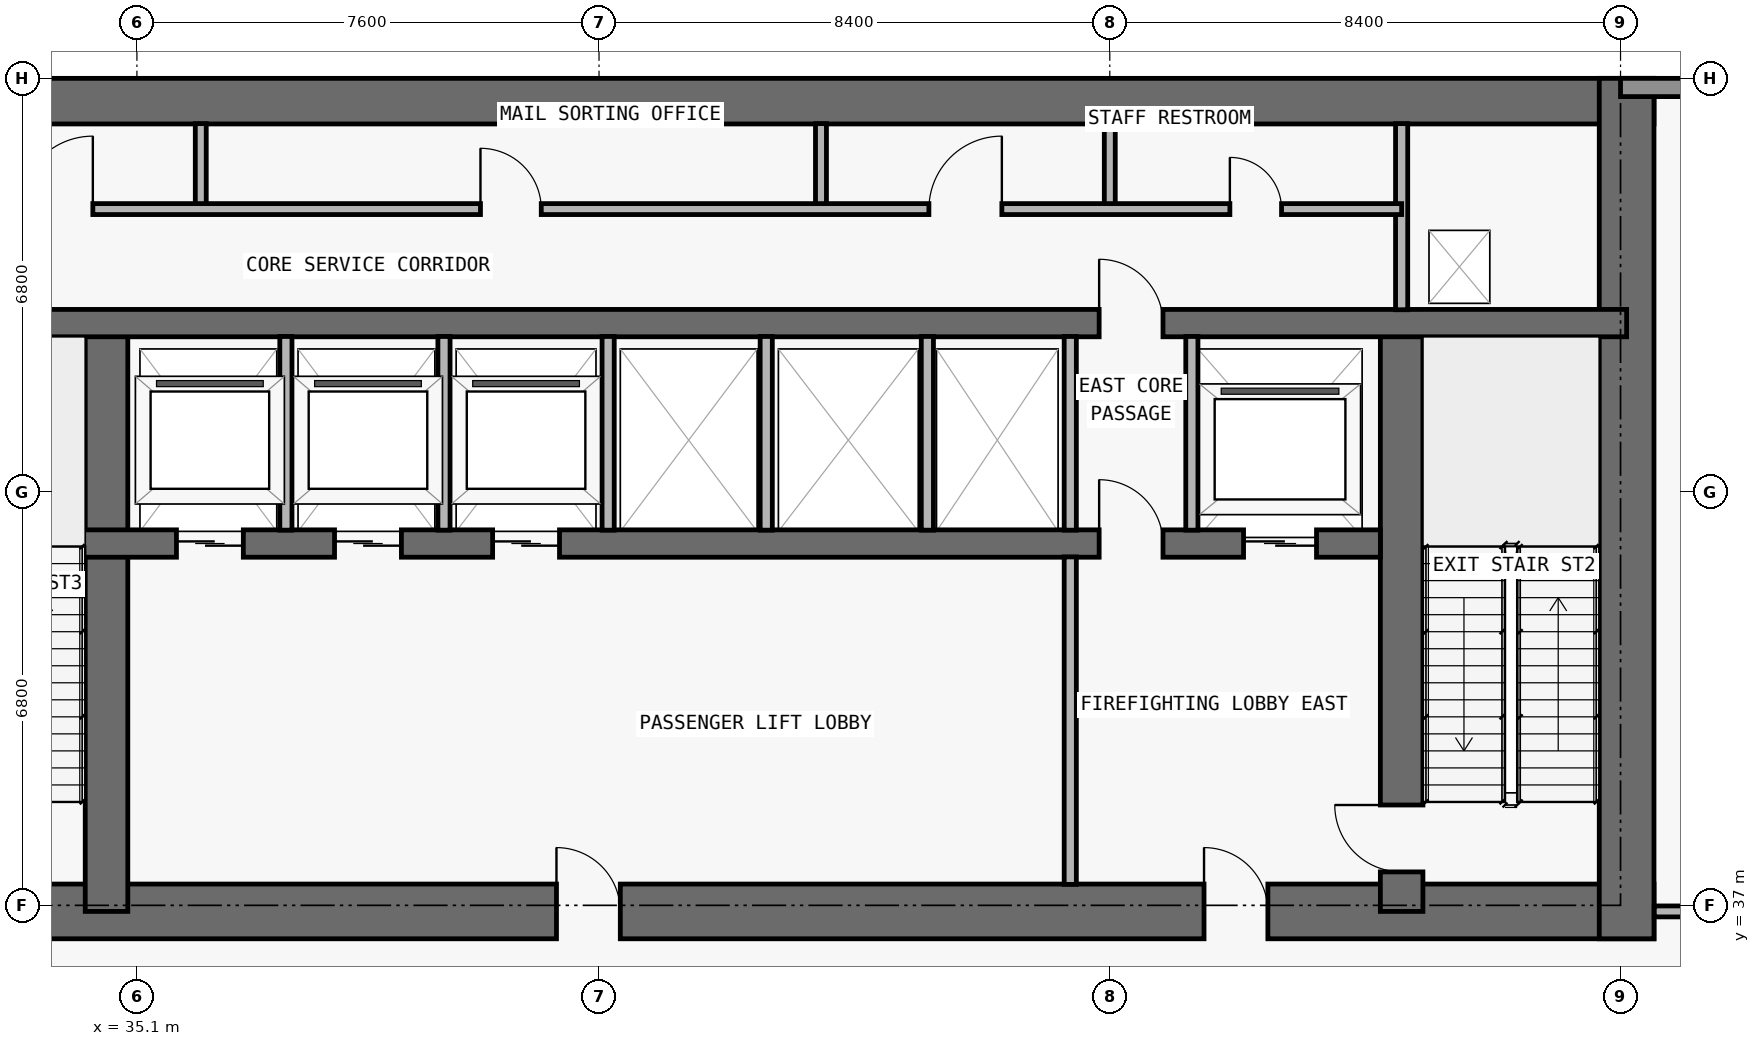
"""IFC4 building model, lengths in metres.
Left out: names, types, materials, properties, quantities, classifications, styles, units other than length and angle.
Written with IfcOpenShell. Run it as: python <this file> out.ifc"""

import sys

from ifc_helpers import new_model, si_unit, direction, frame, frame_2d, origin, place, context, subcontext, project, spatial, rectangle, extrude, element, fill, save


model = new_model("IFC4")
c1 = context("Model", 3, precision=1e-05, world=origin(), true_north=direction((0.0, 1.0)))
c2 = subcontext(c1, "Body", "Model", "MODEL_VIEW")
j1 = project(units=[si_unit("LENGTHUNIT", "METRE"), si_unit("PLANEANGLEUNIT", "RADIAN")], contexts=[c1])
p1 = place(None, origin())
s1 = spatial("IfcSite", under=j1, at=p1, CompositionType="ELEMENT")
p2 = place(p1, origin())
s2 = spatial("IfcBuilding", under=s1, at=p2, CompositionType="ELEMENT")
p3 = place(p2, frame((0.0, 0.0, 24.6)))
s3 = spatial("IfcBuildingStorey", under=s2, at=p3, CompositionType="ELEMENT", Elevation=24.6)
p4 = place(p3, frame((17.75, 36.9, 0.0), z_axis=(0.0, 0.0, 1.0), x_axis=(1.0, 0.0, 0.0)))
e1 = element("IfcWall", 1, at=p4, inside=s3, PredefinedType="SHEAR", context=c2, shape_type="SweptSolid", body=[
    extrude(rectangle(XDim=42.3, YDim=0.9, at=frame_2d((21.15, 0.0))), origin(), (0.0, 0.0, 1.0), 5.15),
])
p5 = place(p4, frame((14.55, 0.0, 0.0)))
e2 = element("IfcOpeningElement", 2, at=p5, cuts=e1, PredefinedType="OPENING", context=c2, shape_type="SweptSolid", body=[
    extrude(rectangle(XDim=1.1, YDim=2.15, at=frame_2d((0.55, 1.075))), frame((0.0, 0.46, 0.0), z_axis=(0.0, -1.0, 0.0), x_axis=(1.0, 0.0, 0.0)), (0.0, 0.0, 1.0), 0.92),
])
p6 = place(p4, frame((6.4, 0.0, 0.0)))
e3 = element("IfcOpeningElement", 3, at=p6, cuts=e1, PredefinedType="OPENING", context=c2, shape_type="SweptSolid", body=[
    extrude(rectangle(XDim=1.05, YDim=2.15, at=frame_2d((0.525, 1.075))), frame((0.0, 0.46, 0.0), z_axis=(0.0, -1.0, 0.0), x_axis=(1.0, 0.0, 0.0)), (0.0, 0.0, 1.0), 0.92),
])
p7 = place(p4, frame((34.9, 0.0, 0.0)))
e4 = element("IfcOpeningElement", 4, at=p7, cuts=e1, PredefinedType="OPENING", context=c2, shape_type="SweptSolid", body=[
    extrude(rectangle(XDim=1.05, YDim=2.15, at=frame_2d((0.525, 1.075))), frame((0.0, 0.46, 0.0), z_axis=(0.0, -1.0, 0.0), x_axis=(1.0, 0.0, 0.0)), (0.0, 0.0, 1.0), 0.92),
])
p8 = place(p4, frame((11.012, 0.0, 0.0)))
e5 = element("IfcOpeningElement", 5, at=p8, cuts=e1, PredefinedType="OPENING", context=c2, shape_type="SweptSolid", body=[
    extrude(rectangle(XDim=1.05, YDim=2.15, at=frame_2d((0.525, 1.075))), frame((0.0, 0.46, 0.0), z_axis=(0.0, -1.0, 0.0), x_axis=(1.0, 0.0, 0.0)), (0.0, 0.0, 1.0), 0.92),
])
p9 = place(p4, frame((24.25, 0.0, 0.0)))
e6 = element("IfcOpeningElement", 6, at=p9, cuts=e1, PredefinedType="OPENING", context=c2, shape_type="SweptSolid", body=[
    extrude(rectangle(XDim=1.05, YDim=2.15, at=frame_2d((0.525, 1.075))), frame((0.0, 0.46, 0.0), z_axis=(0.0, -1.0, 0.0), x_axis=(1.0, 0.0, 0.0)), (0.0, 0.0, 1.0), 0.92),
])
p10 = place(p3, frame((17.75, 50.225, 0.0), z_axis=(0.0, 0.0, 1.0), x_axis=(1.0, 0.0, 0.0)))
e7 = element("IfcWall", 7, at=p10, inside=s3, PredefinedType="SHEAR", context=c2, shape_type="SweptSolid", body=[
    extrude(rectangle(XDim=42.3, YDim=0.75, at=frame_2d((21.15, 0.0))), origin(), (0.0, 0.0, 1.0), 5.15),
])
p11 = place(p3, frame((59.6, 36.45, 0.0), z_axis=(0.0, 0.0, 1.0), x_axis=(0.0, 1.0, 0.0)))
e8 = element("IfcWall", 8, at=p11, inside=s3, PredefinedType="SHEAR", context=c2, shape_type="SweptSolid", body=[
    extrude(rectangle(XDim=14.15, YDim=0.9, at=frame_2d((7.075, 0.0))), origin(), (0.0, 0.0, 1.0), 5.15),
])
p12 = place(p3, frame((55.9, 36.9, 0.0), z_axis=(0.0, 0.0, 1.0), x_axis=(0.0, 1.0, 0.0)))
e9 = element("IfcWall", 9, at=p12, inside=s3, PredefinedType="SHEAR", context=c2, shape_type="SweptSolid", body=[
    extrude(rectangle(XDim=9.675, YDim=0.7, at=frame_2d((4.837, 0.0))), origin(), (0.0, 0.0, 1.0), 5.15),
])
p13 = place(p12, frame((0.65, 0.0, 0.0)))
e10 = element("IfcOpeningElement", 10, at=p13, cuts=e9, PredefinedType="OPENING", context=c2, shape_type="SweptSolid", body=[
    extrude(rectangle(XDim=1.1, YDim=2.15, at=frame_2d((0.55, 1.075))), frame((0.0, 0.36, 0.0), z_axis=(0.0, -1.0, 0.0), x_axis=(1.0, 0.0, 0.0)), (0.0, 0.0, 1.0), 0.72),
])
p14 = place(p3, frame((34.6, 36.9, 0.0), z_axis=(0.0, 0.0, 1.0), x_axis=(0.0, 1.0, 0.0)))
e11 = element("IfcWall", 11, at=p14, inside=s3, PredefinedType="SHEAR", context=c2, shape_type="SweptSolid", body=[
    extrude(rectangle(XDim=9.675, YDim=0.7, at=frame_2d((4.837, 0.0))), origin(), (0.0, 0.0, 1.0), 5.15),
])
p15 = place(p3, frame((22.25, 42.95, 0.0), z_axis=(0.0, 0.0, 1.0), x_axis=(1.0, 0.0, 0.0)))
e12 = element("IfcWall", 12, at=p15, inside=s3, PredefinedType="SHEAR", context=c2, shape_type="SweptSolid", body=[
    extrude(rectangle(XDim=33.3, YDim=0.45, at=frame_2d((16.65, 0.0))), origin(), (0.0, 0.0, 1.0), 5.15),
])
p16 = place(p15, frame((1.05, 0.0, 0.0)))
e13 = element("IfcOpeningElement", 13, at=p16, cuts=e12, PredefinedType="OPENING", context=c2, shape_type="SweptSolid", body=[
    extrude(rectangle(XDim=1.2, YDim=2.2, at=frame_2d((0.6, 1.1))), frame((0.0, 0.235, 0.0), z_axis=(0.0, -1.0, 0.0), x_axis=(1.0, 0.0, 0.0)), (0.0, 0.0, 1.0), 0.47),
])
p17 = place(p15, frame((31.05, 0.0, 0.0)))
e14 = element("IfcOpeningElement", 14, at=p17, cuts=e12, PredefinedType="OPENING", context=c2, shape_type="SweptSolid", body=[
    extrude(rectangle(XDim=1.2, YDim=2.2, at=frame_2d((0.6, 1.1))), frame((0.0, 0.235, 0.0), z_axis=(0.0, -1.0, 0.0), x_axis=(1.0, 0.0, 0.0)), (0.0, 0.0, 1.0), 0.47),
])
p18 = place(p15, frame((13.5, 0.0, 0.0)))
e15 = element("IfcOpeningElement", 15, at=p18, cuts=e12, PredefinedType="OPENING", context=c2, shape_type="SweptSolid", body=[
    extrude(rectangle(XDim=1.1, YDim=2.2, at=frame_2d((0.55, 1.1))), frame((0.0, 0.235, 0.0), z_axis=(0.0, -1.0, 0.0), x_axis=(1.0, 0.0, 0.0)), (0.0, 0.0, 1.0), 0.47),
])
p19 = place(p15, frame((16.1, 0.0, 0.0)))
e16 = element("IfcOpeningElement", 16, at=p19, cuts=e12, PredefinedType="OPENING", context=c2, shape_type="SweptSolid", body=[
    extrude(rectangle(XDim=1.1, YDim=2.2, at=frame_2d((0.55, 1.1))), frame((0.0, 0.235, 0.0), z_axis=(0.0, -1.0, 0.0), x_axis=(1.0, 0.0, 0.0)), (0.0, 0.0, 1.0), 0.47),
])
p20 = place(p15, frame((18.7, 0.0, 0.0)))
e17 = element("IfcOpeningElement", 17, at=p20, cuts=e12, PredefinedType="OPENING", context=c2, shape_type="SweptSolid", body=[
    extrude(rectangle(XDim=1.1, YDim=2.2, at=frame_2d((0.55, 1.1))), frame((0.0, 0.235, 0.0), z_axis=(0.0, -1.0, 0.0), x_axis=(1.0, 0.0, 0.0)), (0.0, 0.0, 1.0), 0.47),
])
p21 = place(p15, frame((3.625, 0.0, 0.0)))
e18 = element("IfcOpeningElement", 18, at=p21, cuts=e12, PredefinedType="OPENING", context=c2, shape_type="SweptSolid", body=[
    extrude(rectangle(XDim=1.05, YDim=2.15, at=frame_2d((0.525, 1.075))), frame((0.0, 0.235, 0.0), z_axis=(0.0, -1.0, 0.0), x_axis=(1.0, 0.0, 0.0)), (0.0, 0.0, 1.0), 0.47),
])
p22 = place(p15, frame((28.675, 0.0, 0.0)))
e19 = element("IfcOpeningElement", 19, at=p22, cuts=e12, PredefinedType="OPENING", context=c2, shape_type="SweptSolid", body=[
    extrude(rectangle(XDim=1.05, YDim=2.15, at=frame_2d((0.525, 1.075))), frame((0.0, 0.235, 0.0), z_axis=(0.0, -1.0, 0.0), x_axis=(1.0, 0.0, 0.0)), (0.0, 0.0, 1.0), 0.47),
])
p23 = place(p3, frame((18.2, 46.575, 0.0), z_axis=(0.0, 0.0, 1.0), x_axis=(1.0, 0.0, 0.0)))
e20 = element("IfcWall", 20, at=p23, inside=s3, PredefinedType="SHEAR", context=c2, shape_type="SweptSolid", body=[
    extrude(rectangle(XDim=41.4, YDim=0.45, at=frame_2d((20.7, 0.0))), origin(), (0.0, 0.0, 1.0), 5.15),
])
p24 = place(p23, frame((7.675, 0.0, 0.0)))
e21 = element("IfcOpeningElement", 21, at=p24, cuts=e20, PredefinedType="OPENING", context=c2, shape_type="SweptSolid", body=[
    extrude(rectangle(XDim=1.05, YDim=2.15, at=frame_2d((0.525, 1.075))), frame((0.0, 0.235, 0.0), z_axis=(0.0, -1.0, 0.0), x_axis=(1.0, 0.0, 0.0)), (0.0, 0.0, 1.0), 0.47),
])
p25 = place(p23, frame((32.725, 0.0, 0.0)))
e22 = element("IfcOpeningElement", 22, at=p25, cuts=e20, PredefinedType="OPENING", context=c2, shape_type="SweptSolid", body=[
    extrude(rectangle(XDim=1.05, YDim=2.15, at=frame_2d((0.525, 1.075))), frame((0.0, 0.235, 0.0), z_axis=(0.0, -1.0, 0.0), x_axis=(1.0, 0.0, 0.0)), (0.0, 0.0, 1.0), 0.47),
])
p26 = place(p3, frame((59.5, 50.45, 0.0), z_axis=(0.0, 0.0, 1.0), x_axis=(1.0, 0.0, 0.0)))
e23 = element("IfcWall", 23, at=p26, inside=s3, PredefinedType="STANDARD", context=c2, shape_type="SweptSolid", body=[
    extrude(rectangle(XDim=13.2, YDim=0.3, at=frame_2d((6.6, 0.0))), origin(), (0.0, 0.0, 1.0), 5.15),
])
p27 = place(p26, frame((5.5, 0.0, 0.85)))
e24 = element("IfcOpeningElement", 24, at=p27, cuts=e23, PredefinedType="OPENING", context=c2, shape_type="SweptSolid", body=[
    extrude(rectangle(XDim=2.2, YDim=1.55, at=frame_2d((1.1, 0.775))), frame((0.0, 0.16, 0.0), z_axis=(0.0, -1.0, 0.0), x_axis=(1.0, 0.0, 0.0)), (0.0, 0.0, 1.0), 0.32),
])
p28 = place(p3, frame((36.15, 48.45, 0.0), z_axis=(0.0, 0.0, 1.0), x_axis=(0.0, 1.0, 0.0)))
e25 = element("IfcWall", 25, at=p28, inside=s3, PredefinedType="PARTITIONING", context=c2, shape_type="SweptSolid", body=[
    extrude(rectangle(XDim=1.405, YDim=0.18, at=frame_2d((0.703, 0.0))), origin(), (0.0, 0.0, 1.0), 5.15),
])
for number, where, z_axis, x_axis in (
    (26, (37.55, 43.17, 0.0), (0.0, 0.0, 1.0), (0.0, 1.0, 0.0)),
    (27, (40.15, 43.17, 0.0), (0.0, 0.0, 1.0), (0.0, 1.0, 0.0)),
    (28, (42.85, 43.17, 0.0), (0.0, 0.0, 1.0), (0.0, 1.0, 0.0)),
    (29, (45.45, 43.17, 0.0), (0.0, 0.0, 1.0), (0.0, 1.0, 0.0)),
):
    element("IfcWall", number, at=place(p3, frame(where, z_axis=z_axis, x_axis=x_axis)), inside=s3, PredefinedType="PARTITIONING", context=c2, shape_type="SweptSolid", body=[
        extrude(rectangle(XDim=3.185, YDim=0.2, at=frame_2d((1.593, 0.0))), origin(), (0.0, 0.0, 1.0), 5.15),
    ])
p29 = place(p3, frame((46.35, 48.45, 0.0), z_axis=(0.0, 0.0, 1.0), x_axis=(0.0, 1.0, 0.0)))
e30 = element("IfcWall", 30, at=p29, inside=s3, PredefinedType="PARTITIONING", context=c2, shape_type="SweptSolid", body=[
    extrude(rectangle(XDim=1.405, YDim=0.18, at=frame_2d((0.703, 0.0))), origin(), (0.0, 0.0, 1.0), 5.15),
])
p30 = place(p3, frame((48.1, 43.17, 0.0), z_axis=(0.0, 0.0, 1.0), x_axis=(0.0, 1.0, 0.0)))
e31 = element("IfcWall", 31, at=p30, inside=s3, PredefinedType="PARTITIONING", context=c2, shape_type="SweptSolid", body=[
    extrude(rectangle(XDim=3.185, YDim=0.2, at=frame_2d((1.593, 0.0))), origin(), (0.0, 0.0, 1.0), 5.15),
])
p31 = place(p3, frame((50.45, 37.345, 0.0), z_axis=(0.0, 0.0, 1.0), x_axis=(0.0, 1.0, 0.0)))
e32 = element("IfcWall", 32, at=p31, inside=s3, PredefinedType="PARTITIONING", context=c2, shape_type="SweptSolid", body=[
    extrude(rectangle(XDim=5.385, YDim=0.2, at=frame_2d((2.692, 0.0))), origin(), (0.0, 0.0, 1.0), 5.15),
])
p32 = place(p3, frame((50.45, 43.17, 0.0), z_axis=(0.0, 0.0, 1.0), x_axis=(0.0, 1.0, 0.0)))
e33 = element("IfcWall", 33, at=p32, inside=s3, PredefinedType="PARTITIONING", context=c2, shape_type="SweptSolid", body=[
    extrude(rectangle(XDim=3.185, YDim=0.2, at=frame_2d((1.593, 0.0))), origin(), (0.0, 0.0, 1.0), 5.15),
])
p33 = place(p3, frame((51.1, 48.45, 0.0), z_axis=(0.0, 0.0, 1.0), x_axis=(0.0, 1.0, 0.0)))
e34 = element("IfcWall", 34, at=p33, inside=s3, PredefinedType="PARTITIONING", context=c2, shape_type="SweptSolid", body=[
    extrude(rectangle(XDim=1.405, YDim=0.18, at=frame_2d((0.703, 0.0))), origin(), (0.0, 0.0, 1.0), 5.15),
])
p34 = place(p3, frame((52.45, 43.17, 0.0), z_axis=(0.0, 0.0, 1.0), x_axis=(0.0, 1.0, 0.0)))
e35 = element("IfcWall", 35, at=p34, inside=s3, PredefinedType="PARTITIONING", context=c2, shape_type="SweptSolid", body=[
    extrude(rectangle(XDim=3.185, YDim=0.2, at=frame_2d((1.593, 0.0))), origin(), (0.0, 0.0, 1.0), 5.15),
])
p35 = place(p3, frame((55.9, 46.795, 0.0), z_axis=(0.0, 0.0, 1.0), x_axis=(0.0, 1.0, 0.0)))
e36 = element("IfcWall", 36, at=p35, inside=s3, PredefinedType="PARTITIONING", context=c2, shape_type="SweptSolid", body=[
    extrude(rectangle(XDim=3.06, YDim=0.2, at=frame_2d((1.53, 0.0))), origin(), (0.0, 0.0, 1.0), 5.15),
])
p36 = place(p3, frame((60.055, 36.9, 0.0), z_axis=(0.0, 0.0, 1.0), x_axis=(1.0, 0.0, 0.0)))
e37 = element("IfcWall", 37, at=p36, inside=s3, PredefinedType="PARTITIONING", context=c2, shape_type="SweptSolid", body=[
    extrude(rectangle(XDim=12.645, YDim=0.18, at=frame_2d((6.323, 0.0))), origin(), (0.0, 0.0, 1.0), 5.15),
])
p37 = place(p36, frame((5.722, 0.0, 0.0)))
e38 = element("IfcOpeningElement", 38, at=p37, cuts=e37, PredefinedType="OPENING", context=c2, shape_type="SweptSolid", body=[
    extrude(rectangle(XDim=1.2, YDim=2.2, at=frame_2d((0.6, 1.1))), frame((0.0, 0.1, 0.0), z_axis=(0.0, -1.0, 0.0), x_axis=(1.0, 0.0, 0.0)), (0.0, 0.0, 1.0), 0.2),
])
p38 = place(p3, frame((26.7, 48.45, 0.0), z_axis=(0.0, 0.0, 1.0), x_axis=(1.0, 0.0, 0.0)))
e39 = element("IfcWall", 39, at=p38, inside=s3, PredefinedType="PARTITIONING", context=c2, shape_type="SweptSolid", body=[
    extrude(rectangle(XDim=29.2, YDim=0.18, at=frame_2d((14.6, 0.0))), origin(), (0.0, 0.0, 1.0), 5.15),
])
p39 = place(p38, frame((1.75, 0.0, 0.0)))
e40 = element("IfcOpeningElement", 40, at=p39, cuts=e39, PredefinedType="OPENING", context=c2, shape_type="SweptSolid", body=[
    extrude(rectangle(XDim=1.2, YDim=2.2, at=frame_2d((0.6, 1.1))), frame((0.0, 0.1, 0.0), z_axis=(0.0, -1.0, 0.0), x_axis=(1.0, 0.0, 0.0)), (0.0, 0.0, 1.0), 0.2),
])
p40 = place(p38, frame((6.475, 0.0, 0.0)))
e41 = element("IfcOpeningElement", 41, at=p40, cuts=e39, PredefinedType="OPENING", context=c2, shape_type="SweptSolid", body=[
    extrude(rectangle(XDim=1.2, YDim=2.2, at=frame_2d((0.6, 1.1))), frame((0.0, 0.1, 0.0), z_axis=(0.0, -1.0, 0.0), x_axis=(1.0, 0.0, 0.0)), (0.0, 0.0, 1.0), 0.2),
])
p41 = place(p38, frame((14.05, 0.0, 0.0)))
e42 = element("IfcOpeningElement", 42, at=p41, cuts=e39, PredefinedType="OPENING", context=c2, shape_type="SweptSolid", body=[
    extrude(rectangle(XDim=1.0, YDim=2.2, at=frame_2d((0.5, 1.1))), frame((0.0, 0.1, 0.0), z_axis=(0.0, -1.0, 0.0), x_axis=(1.0, 0.0, 0.0)), (0.0, 0.0, 1.0), 0.2),
])
p42 = place(p38, frame((21.425, 0.0, 0.0)))
e43 = element("IfcOpeningElement", 43, at=p42, cuts=e39, PredefinedType="OPENING", context=c2, shape_type="SweptSolid", body=[
    extrude(rectangle(XDim=1.2, YDim=2.2, at=frame_2d((0.6, 1.1))), frame((0.0, 0.1, 0.0), z_axis=(0.0, -1.0, 0.0), x_axis=(1.0, 0.0, 0.0)), (0.0, 0.0, 1.0), 0.2),
])
p43 = place(p38, frame((26.375, 0.0, 0.0)))
e44 = element("IfcOpeningElement", 44, at=p43, cuts=e39, PredefinedType="OPENING", context=c2, shape_type="SweptSolid", body=[
    extrude(rectangle(XDim=0.85, YDim=2.1, at=frame_2d((0.425, 1.05))), frame((0.0, 0.1, 0.0), z_axis=(0.0, -1.0, 0.0), x_axis=(1.0, 0.0, 0.0)), (0.0, 0.0, 1.0), 0.2),
])
p44 = place(p17, origin())
e45 = element("IfcDoor", 45, at=p44, inside=s3, OperationType="DOUBLE_DOOR_SLIDING", PredefinedType="DOOR", context=c2, shape_type="SweptSolid", body=[
    extrude(rectangle(XDim=1.2, YDim=2.2, at=frame_2d((0.6, 1.1))), frame((0.0, 0.025, 0.0), z_axis=(0.0, -1.0, 0.0), x_axis=(1.0, 0.0, 0.0)), (0.0, 0.0, 1.0), 0.05),
])
fill(e14, e45)
p45 = place(p18, origin())
e46 = element("IfcDoor", 46, at=p45, inside=s3, OperationType="DOUBLE_DOOR_SLIDING", PredefinedType="DOOR", context=c2, shape_type="SweptSolid", body=[
    extrude(rectangle(XDim=1.1, YDim=2.2, at=frame_2d((0.55, 1.1))), frame((0.0, 0.025, 0.0), z_axis=(0.0, -1.0, 0.0), x_axis=(1.0, 0.0, 0.0)), (0.0, 0.0, 1.0), 0.05),
])
fill(e15, e46)
p46 = place(p19, origin())
e47 = element("IfcDoor", 47, at=p46, inside=s3, OperationType="DOUBLE_DOOR_SLIDING", PredefinedType="DOOR", context=c2, shape_type="SweptSolid", body=[
    extrude(rectangle(XDim=1.1, YDim=2.2, at=frame_2d((0.55, 1.1))), frame((0.0, 0.025, 0.0), z_axis=(0.0, -1.0, 0.0), x_axis=(1.0, 0.0, 0.0)), (0.0, 0.0, 1.0), 0.05),
])
fill(e16, e47)
p47 = place(p20, origin())
e48 = element("IfcDoor", 48, at=p47, inside=s3, OperationType="DOUBLE_DOOR_SLIDING", PredefinedType="DOOR", context=c2, shape_type="SweptSolid", body=[
    extrude(rectangle(XDim=1.1, YDim=2.2, at=frame_2d((0.55, 1.1))), frame((0.0, 0.025, 0.0), z_axis=(0.0, -1.0, 0.0), x_axis=(1.0, 0.0, 0.0)), (0.0, 0.0, 1.0), 0.05),
])
fill(e17, e48)
p48 = place(p7, origin())
e49 = element("IfcDoor", 49, at=p48, inside=s3, OperationType="SINGLE_SWING_LEFT", PredefinedType="DOOR", context=c2, shape_type="SweptSolid", body=[
    extrude(rectangle(XDim=1.05, YDim=2.15, at=frame_2d((0.525, 1.075))), frame((0.0, 0.025, 0.0), z_axis=(0.0, -1.0, 0.0), x_axis=(1.0, 0.0, 0.0)), (0.0, 0.0, 1.0), 0.05),
])
fill(e4, e49)
p49 = place(p13, origin())
e50 = element("IfcDoor", 50, at=p49, inside=s3, OperationType="SINGLE_SWING_RIGHT", PredefinedType="DOOR", context=c2, shape_type="SweptSolid", body=[
    extrude(rectangle(XDim=1.1, YDim=2.15, at=frame_2d((0.55, 1.075))), frame((0.0, 0.025, 0.0), z_axis=(0.0, -1.0, 0.0), x_axis=(1.0, 0.0, 0.0)), (0.0, 0.0, 1.0), 0.05),
])
fill(e10, e50)
p50 = place(p22, origin())
e51 = element("IfcDoor", 51, at=p50, inside=s3, OperationType="SINGLE_SWING_LEFT", PredefinedType="DOOR", context=c2, shape_type="SweptSolid", body=[
    extrude(rectangle(XDim=1.05, YDim=2.15, at=frame_2d((0.525, 1.075))), frame((0.0, 0.025, 0.0), z_axis=(0.0, -1.0, 0.0), x_axis=(1.0, 0.0, 0.0)), (0.0, 0.0, 1.0), 0.05),
])
fill(e19, e51)
p51 = place(p9, origin())
e52 = element("IfcDoor", 52, at=p51, inside=s3, OperationType="SINGLE_SWING_LEFT", PredefinedType="DOOR", context=c2, shape_type="SweptSolid", body=[
    extrude(rectangle(XDim=1.05, YDim=2.15, at=frame_2d((0.525, 1.075))), frame((0.0, 0.025, 0.0), z_axis=(0.0, -1.0, 0.0), x_axis=(1.0, 0.0, 0.0)), (0.0, 0.0, 1.0), 0.05),
])
fill(e6, e52)
p52 = place(p25, origin())
e53 = element("IfcDoor", 53, at=p52, inside=s3, OperationType="SINGLE_SWING_LEFT", PredefinedType="DOOR", context=c2, shape_type="SweptSolid", body=[
    extrude(rectangle(XDim=1.05, YDim=2.15, at=frame_2d((0.525, 1.075))), frame((0.0, 0.025, 0.0), z_axis=(0.0, -1.0, 0.0), x_axis=(1.0, 0.0, 0.0)), (0.0, 0.0, 1.0), 0.05),
])
fill(e22, e53)
p53 = place(p40, origin())
e54 = element("IfcDoor", 54, at=p53, inside=s3, OperationType="SINGLE_SWING_RIGHT", PredefinedType="DOOR", context=c2, shape_type="SweptSolid", body=[
    extrude(rectangle(XDim=1.2, YDim=2.2, at=frame_2d((0.6, 1.1))), frame((0.0, 0.025, 0.0), z_axis=(0.0, -1.0, 0.0), x_axis=(1.0, 0.0, 0.0)), (0.0, 0.0, 1.0), 0.05),
])
fill(e41, e54)
p54 = place(p41, origin())
e55 = element("IfcDoor", 55, at=p54, inside=s3, OperationType="SINGLE_SWING_LEFT", PredefinedType="DOOR", context=c2, shape_type="SweptSolid", body=[
    extrude(rectangle(XDim=1.0, YDim=2.2, at=frame_2d((0.5, 1.1))), frame((0.0, 0.025, 0.0), z_axis=(0.0, -1.0, 0.0), x_axis=(1.0, 0.0, 0.0)), (0.0, 0.0, 1.0), 0.05),
])
fill(e42, e55)
p55 = place(p42, origin())
e56 = element("IfcDoor", 56, at=p55, inside=s3, OperationType="SINGLE_SWING_RIGHT", PredefinedType="DOOR", context=c2, shape_type="SweptSolid", body=[
    extrude(rectangle(XDim=1.2, YDim=2.2, at=frame_2d((0.6, 1.1))), frame((0.0, 0.025, 0.0), z_axis=(0.0, -1.0, 0.0), x_axis=(1.0, 0.0, 0.0)), (0.0, 0.0, 1.0), 0.05),
])
fill(e43, e56)
p56 = place(p43, origin())
e57 = element("IfcDoor", 57, at=p56, inside=s3, OperationType="SINGLE_SWING_LEFT", PredefinedType="DOOR", context=c2, shape_type="SweptSolid", body=[
    extrude(rectangle(XDim=0.85, YDim=2.1, at=frame_2d((0.425, 1.05))), frame((0.0, 0.025, 0.0), z_axis=(0.0, -1.0, 0.0), x_axis=(1.0, 0.0, 0.0)), (0.0, 0.0, 1.0), 0.05),
])
fill(e44, e57)
save(model, sys.argv[1])
